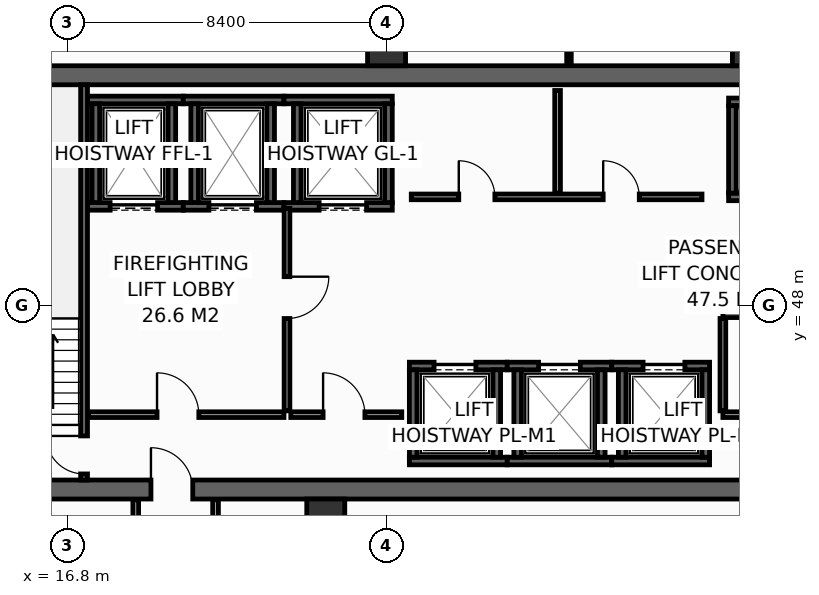
"""IFC4 building model, lengths in metres.
Left out: names, types, materials, properties, quantities, classifications, styles, units other than length and angle.
Written with IfcOpenShell. Run it as: python <this file> out.ifc"""

import sys

from ifc_helpers import new_model, si_unit, direction, frame, frame_2d, origin, origin_2d, place, context, subcontext, project, spatial, rectangle, hollow_rectangle, extrude, element, fill, save


model = new_model("IFC4")
c1 = context("Model", 3, precision=1e-05, world=origin(), true_north=direction((0.0, 1.0)))
c2 = subcontext(c1, "Body", "Model", "MODEL_VIEW")
j1 = project(units=[si_unit("LENGTHUNIT", "METRE"), si_unit("PLANEANGLEUNIT", "RADIAN")], contexts=[c1])
p1 = place(None, origin())
s1 = spatial("IfcSite", under=j1, at=p1, CompositionType="ELEMENT")
p2 = place(p1, origin())
s2 = spatial("IfcBuilding", under=s1, at=p2, CompositionType="ELEMENT")
p3 = place(p2, frame((0.0, 0.0, 152.4)))
s3 = spatial("IfcBuildingStorey", under=s2, at=p3, CompositionType="ELEMENT", Elevation=152.4)
p4 = place(p3, frame((13.6, 43.15, 0.0), z_axis=(0.0, 0.0, 1.0), x_axis=(1.0, 0.0, 0.0)))
e1 = element("IfcWall", 1, at=p4, inside=s3, PredefinedType="SHEAR", context=c2, shape_type="SweptSolid", body=[
    extrude(rectangle(XDim=32.7, YDim=0.5, at=frame_2d((16.35, 0.0))), origin(), (0.0, 0.0, 1.0), 3.55),
])
p5 = place(p4, frame((5.4, 0.0, 0.0)))
e2 = element("IfcOpeningElement", 2, at=p5, cuts=e1, PredefinedType="OPENING", context=c2, shape_type="SweptSolid", body=[
    extrude(rectangle(XDim=1.1, YDim=2.15, at=frame_2d((0.55, 1.075))), frame((0.0, 0.26, 0.0), z_axis=(0.0, -1.0, 0.0), x_axis=(1.0, 0.0, 0.0)), (0.0, 0.0, 1.0), 0.52),
])
p6 = place(p4, frame((25.6, 0.0, 0.0)))
e3 = element("IfcOpeningElement", 3, at=p6, cuts=e1, PredefinedType="OPENING", context=c2, shape_type="SweptSolid", body=[
    extrude(rectangle(XDim=1.1, YDim=2.15, at=frame_2d((0.55, 1.075))), frame((0.0, 0.26, 0.0), z_axis=(0.0, -1.0, 0.0), x_axis=(1.0, 0.0, 0.0)), (0.0, 0.0, 1.0), 0.52),
])
p7 = place(p3, frame((13.6, 54.05, 0.0), z_axis=(0.0, 0.0, 1.0), x_axis=(1.0, 0.0, 0.0)))
e4 = element("IfcWall", 4, at=p7, inside=s3, PredefinedType="SHEAR", context=c2, shape_type="SweptSolid", body=[
    extrude(rectangle(XDim=32.7, YDim=0.5, at=frame_2d((16.35, 0.0))), origin(), (0.0, 0.0, 1.0), 3.55),
])
for number, where, z_axis, x_axis in (
    (5, (25.2, 54.8, 0.0), (0.0, 0.0, 1.0), (1.0, 0.0, 0.0)),
    (6, (34.8, 54.8, 0.0), (0.0, 0.0, 1.0), (1.0, 0.0, 0.0)),
    (7, (23.6, 42.4, 0.0), (0.0, 0.0, 1.0), (1.0, 0.0, 0.0)),
):
    element("IfcColumn", number, at=place(p3, frame(where, z_axis=z_axis, x_axis=x_axis)), inside=s3, PredefinedType="COLUMN", context=c2, shape_type="SweptSolid", body=[
        extrude(hollow_rectangle(XDim=1.0, YDim=1.0, WallThickness=0.045, at=origin_2d()), origin(), (0.0, 0.0, 1.0), 3.8),
    ])
p8 = place(p3, frame((17.33, 50.6, 0.0), z_axis=(0.0, 0.0, 1.0), x_axis=(1.0, 0.0, 0.0)))
e8 = element("IfcWall", 8, at=p8, inside=s3, PredefinedType="SHEAR", context=c2, shape_type="SweptSolid", body=[
    extrude(rectangle(XDim=2.52, YDim=0.2, at=frame_2d((1.26, 0.0))), origin(), (0.0, 0.0, 1.0), 3.55),
])
p9 = place(p8, frame((0.595, 0.0, 0.0)))
e9 = element("IfcOpeningElement", 9, at=p9, cuts=e8, PredefinedType="OPENING", context=c2, shape_type="SweptSolid", body=[
    extrude(rectangle(XDim=1.25, YDim=2.3, at=frame_2d((0.625, 1.15))), frame((0.0, 0.11, 0.0), z_axis=(0.0, -1.0, 0.0), x_axis=(1.0, 0.0, 0.0)), (0.0, 0.0, 1.0), 0.22),
])
p10 = place(p3, frame((17.33, 53.4, 0.0), z_axis=(0.0, 0.0, 1.0), x_axis=(1.0, 0.0, 0.0)))
e10 = element("IfcWall", 10, at=p10, inside=s3, PredefinedType="SHEAR", context=c2, shape_type="SweptSolid", body=[
    extrude(rectangle(XDim=2.52, YDim=0.2, at=frame_2d((1.26, 0.0))), origin(), (0.0, 0.0, 1.0), 3.55),
])
for number, where, z_axis, x_axis in (
    (11, (17.55, 50.7, 0.0), (0.0, 0.0, 1.0), (0.0, 1.0, 0.0)),
    (12, (19.55, 50.7, 0.0), (0.0, 0.0, 1.0), (0.0, 1.0, 0.0)),
):
    element("IfcWall", number, at=place(p3, frame(where, z_axis=z_axis, x_axis=x_axis)), inside=s3, PredefinedType="SHEAR", context=c2, shape_type="SweptSolid", body=[
        extrude(rectangle(XDim=2.6, YDim=0.2, at=frame_2d((1.3, 0.0))), origin(), (0.0, 0.0, 1.0), 3.55),
    ])
p11 = place(p3, frame((19.85, 50.6, 0.0), z_axis=(0.0, 0.0, 1.0), x_axis=(1.0, 0.0, 0.0)))
e13 = element("IfcWall", 13, at=p11, inside=s3, PredefinedType="SHEAR", context=c2, shape_type="SweptSolid", body=[
    extrude(rectangle(XDim=2.65, YDim=0.2, at=frame_2d((1.325, 0.0))), origin(), (0.0, 0.0, 1.0), 3.55),
])
p12 = place(p11, frame((0.675, 0.0, 0.0)))
e14 = element("IfcOpeningElement", 14, at=p12, cuts=e13, PredefinedType="OPENING", context=c2, shape_type="SweptSolid", body=[
    extrude(rectangle(XDim=1.25, YDim=2.3, at=frame_2d((0.625, 1.15))), frame((0.0, 0.11, 0.0), z_axis=(0.0, -1.0, 0.0), x_axis=(1.0, 0.0, 0.0)), (0.0, 0.0, 1.0), 0.22),
])
p13 = place(p3, frame((19.85, 53.4, 0.0), z_axis=(0.0, 0.0, 1.0), x_axis=(1.0, 0.0, 0.0)))
e15 = element("IfcWall", 15, at=p13, inside=s3, PredefinedType="SHEAR", context=c2, shape_type="SweptSolid", body=[
    extrude(rectangle(XDim=2.65, YDim=0.2, at=frame_2d((1.325, 0.0))), origin(), (0.0, 0.0, 1.0), 3.55),
])
for number, where, z_axis, x_axis in (
    (16, (20.15, 50.7, 0.0), (0.0, 0.0, 1.0), (0.0, 1.0, 0.0)),
    (17, (22.15, 50.7, 0.0), (0.0, 0.0, 1.0), (0.0, 1.0, 0.0)),
):
    element("IfcWall", number, at=place(p3, frame(where, z_axis=z_axis, x_axis=x_axis)), inside=s3, PredefinedType="SHEAR", context=c2, shape_type="SweptSolid", body=[
        extrude(rectangle(XDim=2.6, YDim=0.2, at=frame_2d((1.3, 0.0))), origin(), (0.0, 0.0, 1.0), 3.55),
    ])
p14 = place(p3, frame((22.5, 50.6, 0.0), z_axis=(0.0, 0.0, 1.0), x_axis=(1.0, 0.0, 0.0)))
e18 = element("IfcWall", 18, at=p14, inside=s3, PredefinedType="SHEAR", context=c2, shape_type="SweptSolid", body=[
    extrude(rectangle(XDim=2.85, YDim=0.2, at=frame_2d((1.425, 0.0))), origin(), (0.0, 0.0, 1.0), 3.55),
])
p15 = place(p14, frame((0.925, 0.0, 0.0)))
e19 = element("IfcOpeningElement", 19, at=p15, cuts=e18, PredefinedType="OPENING", context=c2, shape_type="SweptSolid", body=[
    extrude(rectangle(XDim=1.25, YDim=2.3, at=frame_2d((0.625, 1.15))), frame((0.0, 0.11, 0.0), z_axis=(0.0, -1.0, 0.0), x_axis=(1.0, 0.0, 0.0)), (0.0, 0.0, 1.0), 0.22),
])
p16 = place(p3, frame((22.5, 53.4, 0.0), z_axis=(0.0, 0.0, 1.0), x_axis=(1.0, 0.0, 0.0)))
e20 = element("IfcWall", 20, at=p16, inside=s3, PredefinedType="SHEAR", context=c2, shape_type="SweptSolid", body=[
    extrude(rectangle(XDim=2.85, YDim=0.2, at=frame_2d((1.425, 0.0))), origin(), (0.0, 0.0, 1.0), 3.55),
])
for number, where, z_axis, x_axis in (
    (21, (22.85, 50.7, 0.0), (0.0, 0.0, 1.0), (0.0, 1.0, 0.0)),
    (22, (25.25, 50.7, 0.0), (0.0, 0.0, 1.0), (0.0, 1.0, 0.0)),
):
    element("IfcWall", number, at=place(p3, frame(where, z_axis=z_axis, x_axis=x_axis)), inside=s3, PredefinedType="SHEAR", context=c2, shape_type="SweptSolid", body=[
        extrude(rectangle(XDim=2.6, YDim=0.2, at=frame_2d((1.3, 0.0))), origin(), (0.0, 0.0, 1.0), 3.55),
    ])
p17 = place(p3, frame((25.8, 43.9, 0.0), z_axis=(0.0, 0.0, 1.0), x_axis=(1.0, 0.0, 0.0)))
e23 = element("IfcWall", 23, at=p17, inside=s3, PredefinedType="SHEAR", context=c2, shape_type="SweptSolid", body=[
    extrude(rectangle(XDim=2.575, YDim=0.2, at=frame_2d((1.288, 0.0))), origin(), (0.0, 0.0, 1.0), 3.55),
])
p18 = place(p3, frame((25.8, 46.4, 0.0), z_axis=(0.0, 0.0, 1.0), x_axis=(1.0, 0.0, 0.0)))
e24 = element("IfcWall", 24, at=p18, inside=s3, PredefinedType="SHEAR", context=c2, shape_type="SweptSolid", body=[
    extrude(rectangle(XDim=2.575, YDim=0.2, at=frame_2d((1.288, 0.0))), origin(), (0.0, 0.0, 1.0), 3.55),
])
p19 = place(p18, frame((0.65, 0.0, 0.0)))
e25 = element("IfcOpeningElement", 25, at=p19, cuts=e24, PredefinedType="OPENING", context=c2, shape_type="SweptSolid", body=[
    extrude(rectangle(XDim=1.1, YDim=2.2, at=frame_2d((0.55, 1.1))), frame((0.0, 0.11, 0.0), z_axis=(0.0, -1.0, 0.0), x_axis=(1.0, 0.0, 0.0)), (0.0, 0.0, 1.0), 0.22),
])
for number, where, z_axis, x_axis in (
    (26, (25.9, 44.0, 0.0), (0.0, 0.0, 1.0), (0.0, 1.0, 0.0)),
    (27, (28.1, 44.0, 0.0), (0.0, 0.0, 1.0), (0.0, 1.0, 0.0)),
):
    element("IfcWall", number, at=place(p3, frame(where, z_axis=z_axis, x_axis=x_axis)), inside=s3, PredefinedType="SHEAR", context=c2, shape_type="SweptSolid", body=[
        extrude(rectangle(XDim=2.3, YDim=0.2, at=frame_2d((1.15, 0.0))), origin(), (0.0, 0.0, 1.0), 3.55),
    ])
p20 = place(p3, frame((28.375, 43.9, 0.0), z_axis=(0.0, 0.0, 1.0), x_axis=(1.0, 0.0, 0.0)))
e28 = element("IfcWall", 28, at=p20, inside=s3, PredefinedType="SHEAR", context=c2, shape_type="SweptSolid", body=[
    extrude(rectangle(XDim=2.75, YDim=0.2, at=frame_2d((1.375, 0.0))), origin(), (0.0, 0.0, 1.0), 3.55),
])
p21 = place(p3, frame((28.375, 46.4, 0.0), z_axis=(0.0, 0.0, 1.0), x_axis=(1.0, 0.0, 0.0)))
e29 = element("IfcWall", 29, at=p21, inside=s3, PredefinedType="SHEAR", context=c2, shape_type="SweptSolid", body=[
    extrude(rectangle(XDim=2.75, YDim=0.2, at=frame_2d((1.375, 0.0))), origin(), (0.0, 0.0, 1.0), 3.55),
])
p22 = place(p21, frame((0.825, 0.0, 0.0)))
e30 = element("IfcOpeningElement", 30, at=p22, cuts=e29, PredefinedType="OPENING", context=c2, shape_type="SweptSolid", body=[
    extrude(rectangle(XDim=1.1, YDim=2.2, at=frame_2d((0.55, 1.1))), frame((0.0, 0.11, 0.0), z_axis=(0.0, -1.0, 0.0), x_axis=(1.0, 0.0, 0.0)), (0.0, 0.0, 1.0), 0.22),
])
for number, where, z_axis, x_axis in (
    (31, (28.65, 44.0, 0.0), (0.0, 0.0, 1.0), (0.0, 1.0, 0.0)),
    (32, (30.85, 44.0, 0.0), (0.0, 0.0, 1.0), (0.0, 1.0, 0.0)),
):
    element("IfcWall", number, at=place(p3, frame(where, z_axis=z_axis, x_axis=x_axis)), inside=s3, PredefinedType="SHEAR", context=c2, shape_type="SweptSolid", body=[
        extrude(rectangle(XDim=2.3, YDim=0.2, at=frame_2d((1.15, 0.0))), origin(), (0.0, 0.0, 1.0), 3.55),
    ])
p23 = place(p3, frame((31.125, 43.9, 0.0), z_axis=(0.0, 0.0, 1.0), x_axis=(1.0, 0.0, 0.0)))
e33 = element("IfcWall", 33, at=p23, inside=s3, PredefinedType="SHEAR", context=c2, shape_type="SweptSolid", body=[
    extrude(rectangle(XDim=2.575, YDim=0.2, at=frame_2d((1.288, 0.0))), origin(), (0.0, 0.0, 1.0), 3.55),
])
p24 = place(p3, frame((31.125, 46.4, 0.0), z_axis=(0.0, 0.0, 1.0), x_axis=(1.0, 0.0, 0.0)))
e34 = element("IfcWall", 34, at=p24, inside=s3, PredefinedType="SHEAR", context=c2, shape_type="SweptSolid", body=[
    extrude(rectangle(XDim=2.575, YDim=0.2, at=frame_2d((1.288, 0.0))), origin(), (0.0, 0.0, 1.0), 3.55),
])
p25 = place(p24, frame((0.825, 0.0, 0.0)))
e35 = element("IfcOpeningElement", 35, at=p25, cuts=e34, PredefinedType="OPENING", context=c2, shape_type="SweptSolid", body=[
    extrude(rectangle(XDim=1.1, YDim=2.2, at=frame_2d((0.55, 1.1))), frame((0.0, 0.11, 0.0), z_axis=(0.0, -1.0, 0.0), x_axis=(1.0, 0.0, 0.0)), (0.0, 0.0, 1.0), 0.22),
])
for number, where, z_axis, x_axis in (
    (36, (31.4, 44.0, 0.0), (0.0, 0.0, 1.0), (0.0, 1.0, 0.0)),
    (37, (33.6, 44.0, 0.0), (0.0, 0.0, 1.0), (0.0, 1.0, 0.0)),
):
    element("IfcWall", number, at=place(p3, frame(where, z_axis=z_axis, x_axis=x_axis)), inside=s3, PredefinedType="SHEAR", context=c2, shape_type="SweptSolid", body=[
        extrude(rectangle(XDim=2.3, YDim=0.2, at=frame_2d((1.15, 0.0))), origin(), (0.0, 0.0, 1.0), 3.55),
    ])
for number, where, z_axis, x_axis in (
    (38, (34.2, 50.85, 0.0), (0.0, 0.0, 1.0), (1.0, 0.0, 0.0)),
    (39, (34.2, 53.35, 0.0), (0.0, 0.0, 1.0), (1.0, 0.0, 0.0)),
):
    element("IfcWall", number, at=place(p3, frame(where, z_axis=z_axis, x_axis=x_axis)), inside=s3, PredefinedType="SHEAR", context=c2, shape_type="SweptSolid", body=[
        extrude(rectangle(XDim=2.575, YDim=0.2, at=frame_2d((1.288, 0.0))), origin(), (0.0, 0.0, 1.0), 3.55),
    ])
p26 = place(p3, frame((34.3, 50.95, 0.0), z_axis=(0.0, 0.0, 1.0), x_axis=(0.0, 1.0, 0.0)))
e40 = element("IfcWall", 40, at=p26, inside=s3, PredefinedType="SHEAR", context=c2, shape_type="SweptSolid", body=[
    extrude(rectangle(XDim=2.3, YDim=0.2, at=frame_2d((1.15, 0.0))), origin(), (0.0, 0.0, 1.0), 3.55),
])
p27 = place(p3, frame((17.24, 43.4, 0.0), z_axis=(0.0, 0.0, 1.0), x_axis=(0.0, 1.0, 0.0)))
e41 = element("IfcWall", 41, at=p27, inside=s3, PredefinedType="SHEAR", context=c2, shape_type="SweptSolid", body=[
    extrude(rectangle(XDim=10.4, YDim=0.18, at=frame_2d((5.2, 0.0))), origin(), (0.0, 0.0, 1.0), 3.55),
])
p28 = place(p27, frame((0.16, 0.0, 0.0)))
e42 = element("IfcOpeningElement", 42, at=p28, cuts=e41, PredefinedType="OPENING", context=c2, shape_type="SweptSolid", body=[
    extrude(rectangle(XDim=1.0, YDim=2.15, at=frame_2d((0.5, 1.075))), frame((0.0, 0.1, 0.0), z_axis=(0.0, -1.0, 0.0), x_axis=(1.0, 0.0, 0.0)), (0.0, 0.0, 1.0), 0.2),
])
p29 = place(p3, frame((17.36, 45.12, 0.0), z_axis=(0.0, 0.0, 1.0), x_axis=(1.0, 0.0, 0.0)))
e43 = element("IfcWall", 43, at=p29, inside=s3, PredefinedType="PARTITIONING", context=c2, shape_type="SweptSolid", body=[
    extrude(rectangle(XDim=5.14, YDim=0.15, at=frame_2d((2.57, 0.0))), origin(), (0.0, 0.0, 1.0), 3.55),
])
p30 = place(p29, frame((1.8, 0.0, 0.0)))
e44 = element("IfcOpeningElement", 44, at=p30, cuts=e43, PredefinedType="OPENING", context=c2, shape_type="SweptSolid", body=[
    extrude(rectangle(XDim=1.1, YDim=2.15, at=frame_2d((0.55, 1.075))), frame((0.0, 0.085, 0.0), z_axis=(0.0, -1.0, 0.0), x_axis=(1.0, 0.0, 0.0)), (0.0, 0.0, 1.0), 0.17),
])
p31 = place(p3, frame((22.58, 50.55, 0.0), z_axis=(0.0, 0.0, 1.0), x_axis=(0.0, -1.0, 0.0)))
e45 = element("IfcWall", 45, at=p31, inside=s3, PredefinedType="PARTITIONING", context=c2, shape_type="SweptSolid", body=[
    extrude(rectangle(XDim=5.33, YDim=0.15, at=frame_2d((2.665, 0.0))), origin(), (0.0, 0.0, 1.0), 3.55),
])
p32 = place(p31, frame((1.8, 0.0, 0.0)))
e46 = element("IfcOpeningElement", 46, at=p32, cuts=e45, PredefinedType="OPENING", context=c2, shape_type="SweptSolid", body=[
    extrude(rectangle(XDim=1.1, YDim=2.15, at=frame_2d((0.55, 1.075))), frame((0.0, 0.085, 0.0), z_axis=(0.0, -1.0, 0.0), x_axis=(1.0, 0.0, 0.0)), (0.0, 0.0, 1.0), 0.17),
])
p33 = place(p3, frame((22.68, 45.12, 0.0), z_axis=(0.0, 0.0, 1.0), x_axis=(1.0, 0.0, 0.0)))
e47 = element("IfcWall", 47, at=p33, inside=s3, PredefinedType="PARTITIONING", context=c2, shape_type="SweptSolid", body=[
    extrude(rectangle(XDim=2.92, YDim=0.15, at=frame_2d((1.46, 0.0))), origin(), (0.0, 0.0, 1.0), 3.55),
])
p34 = place(p33, frame((0.85, 0.0, 0.0)))
e48 = element("IfcOpeningElement", 48, at=p34, cuts=e47, PredefinedType="OPENING", context=c2, shape_type="SweptSolid", body=[
    extrude(rectangle(XDim=1.1, YDim=2.15, at=frame_2d((0.55, 1.075))), frame((0.0, 0.085, 0.0), z_axis=(0.0, -1.0, 0.0), x_axis=(1.0, 0.0, 0.0)), (0.0, 0.0, 1.0), 0.17),
])
p35 = place(p3, frame((34.05, 45.12, 0.0), z_axis=(0.0, 0.0, 1.0), x_axis=(1.0, 0.0, 0.0)))
e49 = element("IfcWall", 49, at=p35, inside=s3, PredefinedType="PARTITIONING", context=c2, shape_type="SweptSolid", body=[
    extrude(rectangle(XDim=8.45, YDim=0.15, at=frame_2d((4.225, 0.0))), origin(), (0.0, 0.0, 1.0), 3.55),
])
p36 = place(p35, frame((3.6, 0.0, 0.0)))
e50 = element("IfcOpeningElement", 50, at=p36, cuts=e49, PredefinedType="OPENING", context=c2, shape_type="SweptSolid", body=[
    extrude(rectangle(XDim=0.95, YDim=2.15, at=frame_2d((0.475, 1.075))), frame((0.0, 0.085, 0.0), z_axis=(0.0, -1.0, 0.0), x_axis=(1.0, 0.0, 0.0)), (0.0, 0.0, 1.0), 0.17),
])
p37 = place(p3, frame((34.05, 47.75, 0.0), z_axis=(0.0, 0.0, 1.0), x_axis=(1.0, 0.0, 0.0)))
e51 = element("IfcWall", 51, at=p37, inside=s3, PredefinedType="PARTITIONING", context=c2, shape_type="SweptSolid", body=[
    extrude(rectangle(XDim=8.45, YDim=0.15, at=frame_2d((4.225, 0.0))), origin(), (0.0, 0.0, 1.0), 3.55),
])
p38 = place(p3, frame((34.05, 45.22, 0.0), z_axis=(0.0, 0.0, 1.0), x_axis=(0.0, 1.0, 0.0)))
e52 = element("IfcWall", 52, at=p38, inside=s3, PredefinedType="PARTITIONING", context=c2, shape_type="SweptSolid", body=[
    extrude(rectangle(XDim=2.43, YDim=0.15, at=frame_2d((1.215, 0.0))), origin(), (0.0, 0.0, 1.0), 3.55),
])
p39 = place(p3, frame((25.85, 50.85, 0.0), z_axis=(0.0, 0.0, 1.0), x_axis=(1.0, 0.0, 0.0)))
e53 = element("IfcWall", 53, at=p39, inside=s3, PredefinedType="PARTITIONING", context=c2, shape_type="SweptSolid", body=[
    extrude(rectangle(XDim=7.65, YDim=0.15, at=frame_2d((3.825, 0.0))), origin(), (0.0, 0.0, 1.0), 3.55),
])
p40 = place(p39, frame((1.25, 0.0, 0.0)))
e54 = element("IfcOpeningElement", 54, at=p40, cuts=e53, PredefinedType="OPENING", context=c2, shape_type="SweptSolid", body=[
    extrude(rectangle(XDim=0.95, YDim=2.15, at=frame_2d((0.475, 1.075))), frame((0.0, 0.085, 0.0), z_axis=(0.0, -1.0, 0.0), x_axis=(1.0, 0.0, 0.0)), (0.0, 0.0, 1.0), 0.17),
])
p41 = place(p39, frame((5.05, 0.0, 0.0)))
e55 = element("IfcOpeningElement", 55, at=p41, cuts=e53, PredefinedType="OPENING", context=c2, shape_type="SweptSolid", body=[
    extrude(rectangle(XDim=0.95, YDim=2.15, at=frame_2d((0.475, 1.075))), frame((0.0, 0.085, 0.0), z_axis=(0.0, -1.0, 0.0), x_axis=(1.0, 0.0, 0.0)), (0.0, 0.0, 1.0), 0.17),
])
p42 = place(p3, frame((29.7, 50.95, 0.0), z_axis=(0.0, 0.0, 1.0), x_axis=(0.0, 1.0, 0.0)))
e56 = element("IfcWall", 56, at=p42, inside=s3, PredefinedType="PARTITIONING", context=c2, shape_type="SweptSolid", body=[
    extrude(rectangle(XDim=2.7, YDim=0.15, at=frame_2d((1.35, 0.0))), origin(), (0.0, 0.0, 1.0), 3.55),
])
p43 = place(p3, frame((30.0, 54.32, 0.0), z_axis=(0.0, 0.0, 1.0), x_axis=(0.0, 1.0, 0.0)))
e57 = element("IfcWall", 57, at=p43, inside=s3, PredefinedType="PARTITIONING", context=c2, shape_type="SweptSolid", body=[
    extrude(rectangle(XDim=1.675, YDim=0.12, at=frame_2d((0.837, 0.0))), origin(), (0.0, 0.0, 1.0), 2.935),
])
for number, where, z_axis, x_axis in (
    (58, (18.6, 41.15, 0.0), (0.0, 0.0, 1.0), (0.0, 1.0, 0.0)),
    (59, (20.7, 41.15, 0.0), (0.0, 0.0, 1.0), (0.0, 1.0, 0.0)),
):
    element("IfcWall", number, at=place(p3, frame(where, z_axis=z_axis, x_axis=x_axis)), inside=s3, PredefinedType="PARTITIONING", context=c2, shape_type="SweptSolid", body=[
        extrude(rectangle(XDim=1.73, YDim=0.15, at=frame_2d((0.865, 0.0))), origin(), (0.0, 0.0, 1.0), 3.55),
    ])
p44 = place(p9, origin())
e60 = element("IfcDoor", 60, at=p44, inside=s3, OperationType="SLIDING_TO_LEFT", PredefinedType="DOOR", context=c2, shape_type="SweptSolid", body=[
    extrude(rectangle(XDim=1.25, YDim=2.3, at=frame_2d((0.625, 1.15))), frame((0.0, 0.025, 0.0), z_axis=(0.0, -1.0, 0.0), x_axis=(1.0, 0.0, 0.0)), (0.0, 0.0, 1.0), 0.05),
])
fill(e9, e60)
p45 = place(p12, origin())
e61 = element("IfcDoor", 61, at=p45, inside=s3, OperationType="SLIDING_TO_LEFT", PredefinedType="DOOR", context=c2, shape_type="SweptSolid", body=[
    extrude(rectangle(XDim=1.25, YDim=2.3, at=frame_2d((0.625, 1.15))), frame((0.0, 0.025, 0.0), z_axis=(0.0, -1.0, 0.0), x_axis=(1.0, 0.0, 0.0)), (0.0, 0.0, 1.0), 0.05),
])
fill(e14, e61)
p46 = place(p15, origin())
e62 = element("IfcDoor", 62, at=p46, inside=s3, OperationType="SLIDING_TO_LEFT", PredefinedType="DOOR", context=c2, shape_type="SweptSolid", body=[
    extrude(rectangle(XDim=1.25, YDim=2.3, at=frame_2d((0.625, 1.15))), frame((0.0, 0.025, 0.0), z_axis=(0.0, -1.0, 0.0), x_axis=(1.0, 0.0, 0.0)), (0.0, 0.0, 1.0), 0.05),
])
fill(e19, e62)
p47 = place(p19, origin())
e63 = element("IfcDoor", 63, at=p47, inside=s3, OperationType="SLIDING_TO_LEFT", PredefinedType="DOOR", context=c2, shape_type="SweptSolid", body=[
    extrude(rectangle(XDim=1.1, YDim=2.2, at=frame_2d((0.55, 1.1))), frame((0.0, 0.025, 0.0), z_axis=(0.0, -1.0, 0.0), x_axis=(1.0, 0.0, 0.0)), (0.0, 0.0, 1.0), 0.05),
])
fill(e25, e63)
p48 = place(p22, origin())
e64 = element("IfcDoor", 64, at=p48, inside=s3, OperationType="SLIDING_TO_LEFT", PredefinedType="DOOR", context=c2, shape_type="SweptSolid", body=[
    extrude(rectangle(XDim=1.1, YDim=2.2, at=frame_2d((0.55, 1.1))), frame((0.0, 0.025, 0.0), z_axis=(0.0, -1.0, 0.0), x_axis=(1.0, 0.0, 0.0)), (0.0, 0.0, 1.0), 0.05),
])
fill(e30, e64)
p49 = place(p25, origin())
e65 = element("IfcDoor", 65, at=p49, inside=s3, OperationType="SLIDING_TO_LEFT", PredefinedType="DOOR", context=c2, shape_type="SweptSolid", body=[
    extrude(rectangle(XDim=1.1, YDim=2.2, at=frame_2d((0.55, 1.1))), frame((0.0, 0.025, 0.0), z_axis=(0.0, -1.0, 0.0), x_axis=(1.0, 0.0, 0.0)), (0.0, 0.0, 1.0), 0.05),
])
fill(e35, e65)
p50 = place(p28, origin())
e66 = element("IfcDoor", 66, at=p50, inside=s3, OperationType="SINGLE_SWING_RIGHT", PredefinedType="DOOR", context=c2, shape_type="SweptSolid", body=[
    extrude(rectangle(XDim=1.0, YDim=2.15, at=frame_2d((0.5, 1.075))), frame((0.0, 0.025, 0.0), z_axis=(0.0, -1.0, 0.0), x_axis=(1.0, 0.0, 0.0)), (0.0, 0.0, 1.0), 0.05),
])
fill(e42, e66)
p51 = place(p30, origin())
e67 = element("IfcDoor", 67, at=p51, inside=s3, OperationType="SINGLE_SWING_LEFT", PredefinedType="DOOR", context=c2, shape_type="SweptSolid", body=[
    extrude(rectangle(XDim=1.1, YDim=2.15, at=frame_2d((0.55, 1.075))), frame((0.0, 0.025, 0.0), z_axis=(0.0, -1.0, 0.0), x_axis=(1.0, 0.0, 0.0)), (0.0, 0.0, 1.0), 0.05),
])
fill(e44, e67)
p52 = place(p32, origin())
e68 = element("IfcDoor", 68, at=p52, inside=s3, OperationType="SINGLE_SWING_LEFT", PredefinedType="DOOR", context=c2, shape_type="SweptSolid", body=[
    extrude(rectangle(XDim=1.1, YDim=2.15, at=frame_2d((0.55, 1.075))), frame((0.0, 0.025, 0.0), z_axis=(0.0, -1.0, 0.0), x_axis=(1.0, 0.0, 0.0)), (0.0, 0.0, 1.0), 0.05),
])
fill(e46, e68)
p53 = place(p34, origin())
e69 = element("IfcDoor", 69, at=p53, inside=s3, OperationType="SINGLE_SWING_LEFT", PredefinedType="DOOR", context=c2, shape_type="SweptSolid", body=[
    extrude(rectangle(XDim=1.1, YDim=2.15, at=frame_2d((0.55, 1.075))), frame((0.0, 0.025, 0.0), z_axis=(0.0, -1.0, 0.0), x_axis=(1.0, 0.0, 0.0)), (0.0, 0.0, 1.0), 0.05),
])
fill(e48, e69)
p54 = place(p5, origin())
e70 = element("IfcDoor", 70, at=p54, inside=s3, OperationType="SINGLE_SWING_LEFT", PredefinedType="DOOR", context=c2, shape_type="SweptSolid", body=[
    extrude(rectangle(XDim=1.1, YDim=2.15, at=frame_2d((0.55, 1.075))), frame((0.0, 0.025, 0.0), z_axis=(0.0, -1.0, 0.0), x_axis=(1.0, 0.0, 0.0)), (0.0, 0.0, 1.0), 0.05),
])
fill(e2, e70)
p55 = place(p40, origin())
e71 = element("IfcDoor", 71, at=p55, inside=s3, OperationType="SINGLE_SWING_LEFT", PredefinedType="DOOR", context=c2, shape_type="SweptSolid", body=[
    extrude(rectangle(XDim=0.95, YDim=2.15, at=frame_2d((0.475, 1.075))), frame((0.0, 0.025, 0.0), z_axis=(0.0, -1.0, 0.0), x_axis=(1.0, 0.0, 0.0)), (0.0, 0.0, 1.0), 0.05),
])
fill(e54, e71)
p56 = place(p41, origin())
e72 = element("IfcDoor", 72, at=p56, inside=s3, OperationType="SINGLE_SWING_LEFT", PredefinedType="DOOR", context=c2, shape_type="SweptSolid", body=[
    extrude(rectangle(XDim=0.95, YDim=2.15, at=frame_2d((0.475, 1.075))), frame((0.0, 0.025, 0.0), z_axis=(0.0, -1.0, 0.0), x_axis=(1.0, 0.0, 0.0)), (0.0, 0.0, 1.0), 0.05),
])
fill(e55, e72)
save(model, sys.argv[1])
